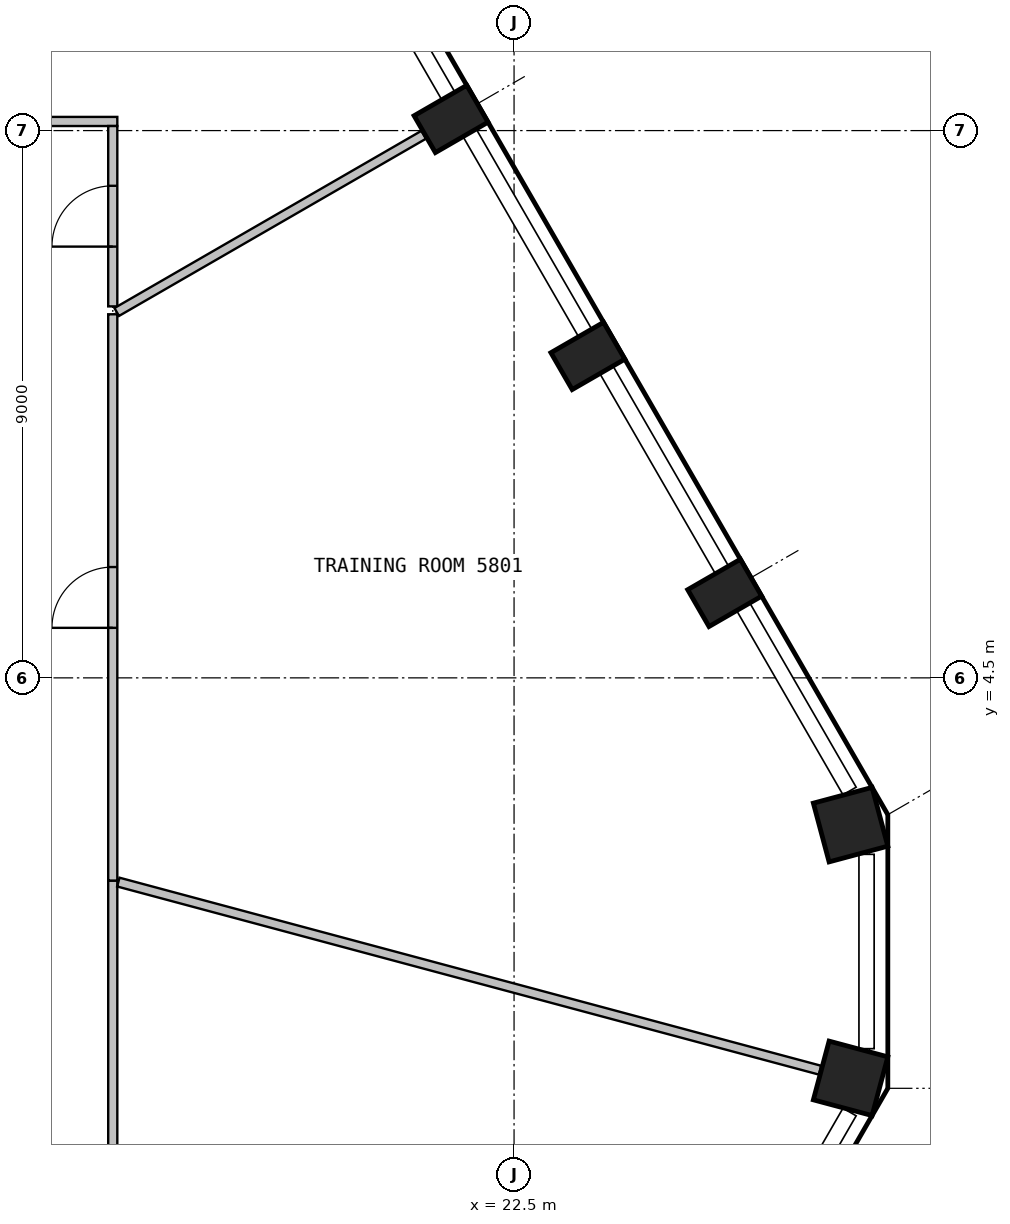
"""IFC4 building model, lengths in metres.
Left out: names, types, materials, properties, quantities, classifications, styles, units other than length and angle.
Written with IfcOpenShell. Run it as: python <this file> out.ifc"""

import sys

from ifc_helpers import new_model, si_unit, direction, frame, frame_2d, origin, origin_2d, place, context, subcontext, project, spatial, rectangle, extrude, element, fill, save


model = new_model("IFC4")
c1 = context("Model", 3, precision=1e-05, world=origin(), true_north=direction((0.0, 1.0)))
c2 = subcontext(c1, "Body", "Model", "MODEL_VIEW")
j1 = project(units=[si_unit("LENGTHUNIT", "METRE"), si_unit("PLANEANGLEUNIT", "RADIAN")], contexts=[c1])
p1 = place(None, origin())
s1 = spatial("IfcSite", under=j1, at=p1, CompositionType="ELEMENT")
p2 = place(p1, origin())
s2 = spatial("IfcBuilding", under=s1, at=p2, CompositionType="ELEMENT")
p3 = place(p2, frame((0.0, 0.0, 235.2)))
s3 = spatial("IfcBuildingStorey", under=s2, at=p3, CompositionType="ELEMENT", Elevation=235.2)
for number, where, z_axis, x_axis in (
    (1, (28.035, -2.086, 0.0), (0.0, 0.0, 1.0), (0.259, 0.966, 0.0)),
    (2, (28.035, 2.086, 0.0), (0.0, 0.0, 1.0), (-0.259, 0.966, 0.0)),
):
    element("IfcColumn", number, at=place(p3, frame(where, z_axis=z_axis, x_axis=x_axis)), inside=s3, PredefinedType="COLUMN", context=c2, shape_type="SweptSolid", body=[
        extrude(rectangle(XDim=1.0, YDim=1.0, at=origin_2d()), origin(), (0.0, 0.0, 1.0), 3.575),
    ])
for number, where, z_axis, x_axis in (
    (3, (25.964, 5.897, 0.0), (0.0, 0.0, 1.0), (-0.5, 0.866, 0.0)),
    (4, (23.714, 9.794, 0.0), (0.0, 0.0, 1.0), (-0.5, 0.866, 0.0)),
    (5, (21.464, 13.691, 0.0), (0.0, 0.0, 1.0), (-0.5, 0.866, 0.0)),
):
    element("IfcColumn", number, at=place(p3, frame(where, z_axis=z_axis, x_axis=x_axis)), inside=s3, PredefinedType="COLUMN", context=c2, shape_type="SweptSolid", body=[
        extrude(rectangle(XDim=0.7, YDim=1.0, at=origin_2d()), origin(), (0.0, 0.0, 1.0), 3.575),
    ])
p4 = place(p3, frame((15.452, 18.974, 0.0), z_axis=(0.0, 0.0, 1.0), x_axis=(-0.258889468925, -0.965906953531, 0.0)))
e6 = element("IfcWall", 6, at=p4, inside=s3, PredefinedType="PARTITIONING", context=c2, shape_type="SweptSolid", body=[
    extrude(rectangle(XDim=5.437, YDim=0.15, at=frame_2d((2.718, 0.0))), origin(), (0.0, 0.0, 1.0), 3.575),
])
p5 = place(p3, frame((15.975, 13.65, 0.0), z_axis=(0.0, 0.0, 1.0), x_axis=(-1.0, 0.0, 0.0)))
e7 = element("IfcWall", 7, at=p5, inside=s3, PredefinedType="PARTITIONING", context=c2, shape_type="SweptSolid", body=[
    extrude(rectangle(XDim=1.855, YDim=0.15, at=frame_2d((0.927, 0.0))), origin(), (0.0, 0.0, 1.0), 3.575),
])
p6 = place(p3, frame((15.9, -13.575, 0.0), z_axis=(0.0, 0.0, 1.0), x_axis=(0.0, 1.0, 0.0)))
e8 = element("IfcWall", 8, at=p6, inside=s3, PredefinedType="PARTITIONING", context=c2, shape_type="SweptSolid", body=[
    extrude(rectangle(XDim=14.741, YDim=0.15, at=frame_2d((7.371, 0.0))), origin(), (0.0, 0.0, 1.0), 3.575),
])
p7 = place(p6, frame((6.871, 0.0, 0.0)))
e9 = element("IfcOpeningElement", 9, at=p7, cuts=e8, PredefinedType="OPENING", context=c2, shape_type="SweptSolid", body=[
    extrude(rectangle(XDim=1.0, YDim=2.1, at=frame_2d((0.5, 1.05))), frame((0.0, 0.085, 0.0), z_axis=(0.0, -1.0, 0.0), x_axis=(1.0, 0.0, 0.0)), (0.0, 0.0, 1.0), 0.17),
])
p8 = place(p3, frame((15.9, 1.166, 0.0), z_axis=(0.0, 0.0, 1.0), x_axis=(0.0, 1.0, 0.0)))
e10 = element("IfcWall", 10, at=p8, inside=s3, PredefinedType="PARTITIONING", context=c2, shape_type="SweptSolid", body=[
    extrude(rectangle(XDim=9.313, YDim=0.15, at=frame_2d((4.656, 0.0))), origin(), (0.0, 0.0, 1.0), 3.575),
])
p9 = place(p8, frame((4.156, 0.0, 0.0)))
e11 = element("IfcOpeningElement", 11, at=p9, cuts=e10, PredefinedType="OPENING", context=c2, shape_type="SweptSolid", body=[
    extrude(rectangle(XDim=1.0, YDim=2.1, at=frame_2d((0.5, 1.05))), frame((0.0, 0.085, 0.0), z_axis=(0.0, -1.0, 0.0), x_axis=(1.0, 0.0, 0.0)), (0.0, 0.0, 1.0), 0.17),
])
p10 = place(p3, frame((15.992, 1.141, 0.0), z_axis=(0.0, 0.0, 1.0), x_axis=(0.965910286237, -0.258877034405, 0.0)))
e12 = element("IfcWall", 12, at=p10, inside=s3, PredefinedType="PARTITIONING", context=c2, shape_type="SweptSolid", body=[
    extrude(rectangle(XDim=11.948, YDim=0.15, at=frame_2d((5.974, 0.0))), origin(), (0.0, 0.0, 1.0), 3.575),
])
p11 = place(p3, frame((15.9, 10.609, 0.0), z_axis=(0.0, 0.0, 1.0), x_axis=(0.0, 1.0, 0.0)))
e13 = element("IfcWall", 13, at=p11, inside=s3, PredefinedType="PARTITIONING", context=c2, shape_type="SweptSolid", body=[
    extrude(rectangle(XDim=2.966, YDim=0.15, at=frame_2d((1.483, 0.0))), origin(), (0.0, 0.0, 1.0), 3.575),
])
p12 = place(p11, frame((0.983, 0.0, 0.0)))
e14 = element("IfcOpeningElement", 14, at=p12, cuts=e13, PredefinedType="OPENING", context=c2, shape_type="SweptSolid", body=[
    extrude(rectangle(XDim=1.0, YDim=2.1, at=frame_2d((0.5, 1.05))), frame((0.0, 0.085, 0.0), z_axis=(0.0, -1.0, 0.0), x_axis=(1.0, 0.0, 0.0)), (0.0, 0.0, 1.0), 0.17),
])
p13 = place(p3, frame((21.014, 13.431, 0.0), z_axis=(0.0, 0.0, 1.0), x_axis=(-0.866054481515, -0.499949632511, 0.0)))
e15 = element("IfcWall", 15, at=p13, inside=s3, PredefinedType="PARTITIONING", context=c2, shape_type="SweptSolid", body=[
    extrude(rectangle(XDim=5.83, YDim=0.15, at=frame_2d((2.915, 0.0))), origin(), (0.0, 0.0, 1.0), 3.575),
])
p14 = place(p12, origin())
e16 = element("IfcDoor", 16, at=p14, inside=s3, OperationType="SINGLE_SWING_RIGHT", PredefinedType="DOOR", context=c2, shape_type="SweptSolid", body=[
    extrude(rectangle(XDim=1.0, YDim=2.1, at=frame_2d((0.5, 1.05))), frame((0.0, 0.025, 0.0), z_axis=(0.0, -1.0, 0.0), x_axis=(1.0, 0.0, 0.0)), (0.0, 0.0, 1.0), 0.05),
])
fill(e14, e16)
p15 = place(p9, origin())
e17 = element("IfcDoor", 17, at=p15, inside=s3, OperationType="SINGLE_SWING_LEFT", PredefinedType="DOOR", context=c2, shape_type="SweptSolid", body=[
    extrude(rectangle(XDim=1.0, YDim=2.1, at=frame_2d((0.5, 1.05))), frame((0.0, 0.025, 0.0), z_axis=(0.0, -1.0, 0.0), x_axis=(1.0, 0.0, 0.0)), (0.0, 0.0, 1.0), 0.05),
])
fill(e11, e17)
save(model, sys.argv[1])
